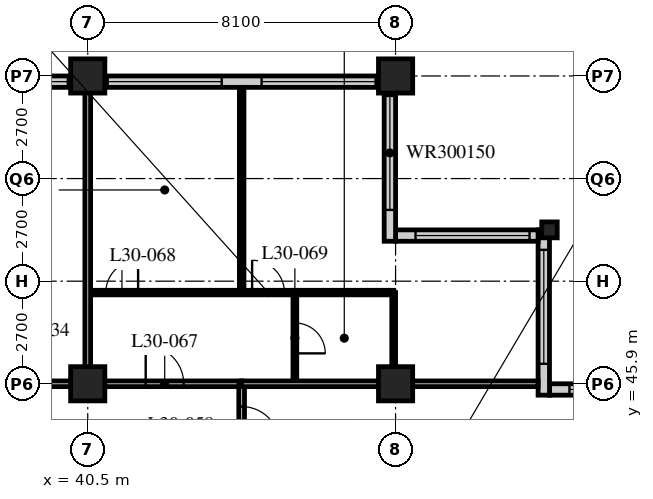
"""IFC4 building model, lengths in metres.
Left out: names, types, materials, properties, quantities, classifications, styles, units other than length and angle.
Written with IfcOpenShell. Run it as: python <this file> out.ifc"""

import sys

from ifc_helpers import new_model, si_unit, direction, frame, frame_2d, origin, origin_2d, place, context, subcontext, project, spatial, rectangle, hollow_rectangle, i_section, extrude, element, fill, save


model = new_model("IFC4")
c1 = context("Model", 3, precision=1e-05, world=origin(), true_north=direction((0.0, 1.0)))
c2 = subcontext(c1, "Body", "Model", "MODEL_VIEW")
j1 = project(units=[si_unit("LENGTHUNIT", "METRE"), si_unit("PLANEANGLEUNIT", "RADIAN")], contexts=[c1])
p1 = place(None, origin())
s1 = spatial("IfcSite", under=j1, at=p1, CompositionType="ELEMENT")
p2 = place(p1, origin())
s2 = spatial("IfcBuilding", under=s1, at=p2, CompositionType="ELEMENT")
p3 = place(p2, frame((0.0, 0.0, 120.4)))
s3 = spatial("IfcBuildingStorey", under=s2, at=p3, CompositionType="ELEMENT", Elevation=120.4)
for number, where, z_axis, x_axis in (
    (1, (40.5, 45.9, 0.0), (0.0, 0.0, 1.0), (1.0, 0.0, 0.0)),
    (2, (40.5, 54.0, 0.0), (0.0, 0.0, 1.0), (1.0, 0.0, 0.0)),
    (3, (48.6, 45.9, 0.0), (0.0, 0.0, 1.0), (1.0, 0.0, 0.0)),
    (4, (48.6, 54.0, 0.0), (0.0, 0.0, 1.0), (1.0, 0.0, 0.0)),
):
    element("IfcColumn", number, at=place(p3, frame(where, z_axis=z_axis, x_axis=x_axis)), inside=s3, PredefinedType="COLUMN", context=c2, shape_type="SweptSolid", body=[
        extrude(hollow_rectangle(XDim=0.9, YDim=0.9, WallThickness=0.09, at=origin_2d()), origin(), (0.0, 0.0, 1.0), 3.4),
    ])
p4 = place(p3, frame((52.65, 49.95, 0.0), z_axis=(0.0, 0.0, 1.0), x_axis=(1.0, 0.0, 0.0)))
e5 = element("IfcColumn", 5, at=p4, inside=s3, PredefinedType="COLUMN", context=c2, shape_type="SweptSolid", body=[
    extrude(i_section(OverallWidth=0.407, OverallDepth=0.419, WebThickness=0.031, FlangeThickness=0.049, FilletRadius=0.015, at=origin_2d()), origin(), (0.0, 0.0, 1.0), 3.4),
])
p5 = place(p3, frame((56.4, 45.75, 0.0), z_axis=(0.0, 0.0, 1.0), x_axis=(-1.0, 0.0, 0.0)))
e6 = element("IfcWall", 6, at=p5, inside=s3, PredefinedType="SOLIDWALL", context=c2, shape_type="SweptSolid", body=[
    extrude(rectangle(XDim=3.75, YDim=0.3, at=frame_2d((1.875, 0.0))), origin(), (0.0, 0.0, 1.0), 3.19),
])
p6 = place(p5, frame((0.225, 0.0, 0.9)))
e7 = element("IfcOpeningElement", 7, at=p6, cuts=e6, PredefinedType="OPENING", context=c2, shape_type="SweptSolid", body=[
    extrude(rectangle(XDim=3.0, YDim=1.5, at=frame_2d((1.5, 0.75))), frame((0.0, 0.16, 0.0), z_axis=(0.0, -1.0, 0.0), x_axis=(1.0, 0.0, 0.0)), (0.0, 0.0, 1.0), 0.32),
])
p7 = place(p3, frame((52.5, 45.6, 0.0), z_axis=(0.0, 0.0, 1.0), x_axis=(0.0, 1.0, 0.0)))
e8 = element("IfcWall", 8, at=p7, inside=s3, PredefinedType="SOLIDWALL", context=c2, shape_type="SweptSolid", body=[
    extrude(rectangle(XDim=4.35, YDim=0.3, at=frame_2d((2.175, 0.0))), origin(), (0.0, 0.0, 1.0), 3.19),
])
p8 = place(p7, frame((0.825, 0.0, 0.9)))
e9 = element("IfcOpeningElement", 9, at=p8, cuts=e8, PredefinedType="OPENING", context=c2, shape_type="SweptSolid", body=[
    extrude(rectangle(XDim=3.0, YDim=1.5, at=frame_2d((1.5, 0.75))), frame((0.0, 0.16, 0.0), z_axis=(0.0, -1.0, 0.0), x_axis=(1.0, 0.0, 0.0)), (0.0, 0.0, 1.0), 0.32),
])
p9 = place(p3, frame((52.35, 49.8, 0.0), z_axis=(0.0, 0.0, 1.0), x_axis=(-1.0, 0.0, 0.0)))
e10 = element("IfcWall", 10, at=p9, inside=s3, PredefinedType="SOLIDWALL", context=c2, shape_type="SweptSolid", body=[
    extrude(rectangle(XDim=3.75, YDim=0.3, at=frame_2d((1.875, 0.0))), origin(), (0.0, 0.0, 1.0), 3.19),
])
p10 = place(p9, frame((0.225, 0.0, 0.9)))
e11 = element("IfcOpeningElement", 11, at=p10, cuts=e10, PredefinedType="OPENING", context=c2, shape_type="SweptSolid", body=[
    extrude(rectangle(XDim=3.0, YDim=1.5, at=frame_2d((1.5, 0.75))), frame((0.0, 0.16, 0.0), z_axis=(0.0, -1.0, 0.0), x_axis=(1.0, 0.0, 0.0)), (0.0, 0.0, 1.0), 0.32),
])
p11 = place(p3, frame((48.45, 49.65, 0.0), z_axis=(0.0, 0.0, 1.0), x_axis=(0.0, 1.0, 0.0)))
e12 = element("IfcWall", 12, at=p11, inside=s3, PredefinedType="SOLIDWALL", context=c2, shape_type="SweptSolid", body=[
    extrude(rectangle(XDim=4.35, YDim=0.3, at=frame_2d((2.175, 0.0))), origin(), (0.0, 0.0, 1.0), 3.19),
])
p12 = place(p11, frame((0.825, 0.0, 0.9)))
e13 = element("IfcOpeningElement", 13, at=p12, cuts=e12, PredefinedType="OPENING", context=c2, shape_type="SweptSolid", body=[
    extrude(rectangle(XDim=3.0, YDim=1.5, at=frame_2d((1.5, 0.75))), frame((0.0, 0.16, 0.0), z_axis=(0.0, -1.0, 0.0), x_axis=(1.0, 0.0, 0.0)), (0.0, 0.0, 1.0), 0.32),
])
p13 = place(p3, frame((48.3, 53.85, 0.0), z_axis=(0.0, 0.0, 1.0), x_axis=(-1.0, 0.0, 0.0)))
e14 = element("IfcWall", 14, at=p13, inside=s3, PredefinedType="SOLIDWALL", context=c2, shape_type="SweptSolid", body=[
    extrude(rectangle(XDim=40.2, YDim=0.3, at=frame_2d((20.1, 0.0))), origin(), (0.0, 0.0, 1.0), 3.19),
])
p14 = place(p13, frame((0.225, 0.0, 0.9)))
e15 = element("IfcOpeningElement", 15, at=p14, cuts=e14, PredefinedType="OPENING", context=c2, shape_type="SweptSolid", body=[
    extrude(rectangle(XDim=3.0, YDim=2.0, at=frame_2d((1.5, 1.0))), frame((0.0, 0.16, 0.0), z_axis=(0.0, -1.0, 0.0), x_axis=(1.0, 0.0, 0.0)), (0.0, 0.0, 1.0), 0.32),
])
p15 = place(p13, frame((4.275, 0.0, 0.9)))
e16 = element("IfcOpeningElement", 16, at=p15, cuts=e14, PredefinedType="OPENING", context=c2, shape_type="SweptSolid", body=[
    extrude(rectangle(XDim=3.0, YDim=2.0, at=frame_2d((1.5, 1.0))), frame((0.0, 0.16, 0.0), z_axis=(0.0, -1.0, 0.0), x_axis=(1.0, 0.0, 0.0)), (0.0, 0.0, 1.0), 0.32),
])
p16 = place(p13, frame((8.325, 0.0, 0.9)))
e17 = element("IfcOpeningElement", 17, at=p16, cuts=e14, PredefinedType="OPENING", context=c2, shape_type="SweptSolid", body=[
    extrude(rectangle(XDim=3.0, YDim=2.0, at=frame_2d((1.5, 1.0))), frame((0.0, 0.16, 0.0), z_axis=(0.0, -1.0, 0.0), x_axis=(1.0, 0.0, 0.0)), (0.0, 0.0, 1.0), 0.32),
])
p17 = place(p13, frame((12.375, 0.0, 0.9)))
e18 = element("IfcOpeningElement", 18, at=p17, cuts=e14, PredefinedType="OPENING", context=c2, shape_type="SweptSolid", body=[
    extrude(rectangle(XDim=3.0, YDim=2.0, at=frame_2d((1.5, 1.0))), frame((0.0, 0.16, 0.0), z_axis=(0.0, -1.0, 0.0), x_axis=(1.0, 0.0, 0.0)), (0.0, 0.0, 1.0), 0.32),
])
p18 = place(p13, frame((16.425, 0.0, 0.9)))
e19 = element("IfcOpeningElement", 19, at=p18, cuts=e14, PredefinedType="OPENING", context=c2, shape_type="SweptSolid", body=[
    extrude(rectangle(XDim=3.0, YDim=2.0, at=frame_2d((1.5, 1.0))), frame((0.0, 0.16, 0.0), z_axis=(0.0, -1.0, 0.0), x_axis=(1.0, 0.0, 0.0)), (0.0, 0.0, 1.0), 0.32),
])
p19 = place(p13, frame((20.475, 0.0, 0.9)))
e20 = element("IfcOpeningElement", 20, at=p19, cuts=e14, PredefinedType="OPENING", context=c2, shape_type="SweptSolid", body=[
    extrude(rectangle(XDim=3.0, YDim=2.0, at=frame_2d((1.5, 1.0))), frame((0.0, 0.16, 0.0), z_axis=(0.0, -1.0, 0.0), x_axis=(1.0, 0.0, 0.0)), (0.0, 0.0, 1.0), 0.32),
])
p20 = place(p13, frame((24.525, 0.0, 0.9)))
e21 = element("IfcOpeningElement", 21, at=p20, cuts=e14, PredefinedType="OPENING", context=c2, shape_type="SweptSolid", body=[
    extrude(rectangle(XDim=3.0, YDim=2.0, at=frame_2d((1.5, 1.0))), frame((0.0, 0.16, 0.0), z_axis=(0.0, -1.0, 0.0), x_axis=(1.0, 0.0, 0.0)), (0.0, 0.0, 1.0), 0.32),
])
p21 = place(p13, frame((28.575, 0.0, 0.9)))
e22 = element("IfcOpeningElement", 22, at=p21, cuts=e14, PredefinedType="OPENING", context=c2, shape_type="SweptSolid", body=[
    extrude(rectangle(XDim=3.0, YDim=2.0, at=frame_2d((1.5, 1.0))), frame((0.0, 0.16, 0.0), z_axis=(0.0, -1.0, 0.0), x_axis=(1.0, 0.0, 0.0)), (0.0, 0.0, 1.0), 0.32),
])
p22 = place(p13, frame((32.625, 0.0, 0.9)))
e23 = element("IfcOpeningElement", 23, at=p22, cuts=e14, PredefinedType="OPENING", context=c2, shape_type="SweptSolid", body=[
    extrude(rectangle(XDim=3.0, YDim=2.0, at=frame_2d((1.5, 1.0))), frame((0.0, 0.16, 0.0), z_axis=(0.0, -1.0, 0.0), x_axis=(1.0, 0.0, 0.0)), (0.0, 0.0, 1.0), 0.32),
])
p23 = place(p13, frame((36.675, 0.0, 0.9)))
e24 = element("IfcOpeningElement", 24, at=p23, cuts=e14, PredefinedType="OPENING", context=c2, shape_type="SweptSolid", body=[
    extrude(rectangle(XDim=3.0, YDim=2.0, at=frame_2d((1.5, 1.0))), frame((0.0, 0.16, 0.0), z_axis=(0.0, -1.0, 0.0), x_axis=(1.0, 0.0, 0.0)), (0.0, 0.0, 1.0), 0.32),
])
p24 = place(p3, frame((12.15, 45.9, 0.0), z_axis=(0.0, 0.0, 1.0), x_axis=(1.0, 0.0, 0.0)))
e25 = element("IfcWall", 25, at=p24, inside=s3, PredefinedType="PARTITIONING", context=c2, shape_type="SweptSolid", body=[
    extrude(rectangle(XDim=32.4, YDim=0.15, at=frame_2d((16.2, 0.0))), origin(), (0.0, 0.0, 1.0), 2.578),
])
p25 = place(p24, frame((5.95, 0.0, 0.0)))
e26 = element("IfcOpeningElement", 26, at=p25, cuts=e25, PredefinedType="OPENING", context=c2, shape_type="SweptSolid", body=[
    extrude(rectangle(XDim=1.0, YDim=2.1, at=frame_2d((0.5, 1.05))), frame((0.0, 0.085, 0.0), z_axis=(0.0, -1.0, 0.0), x_axis=(1.0, 0.0, 0.0)), (0.0, 0.0, 1.0), 0.17),
])
p26 = place(p24, frame((14.05, 0.0, 0.0)))
e27 = element("IfcOpeningElement", 27, at=p26, cuts=e25, PredefinedType="OPENING", context=c2, shape_type="SweptSolid", body=[
    extrude(rectangle(XDim=1.0, YDim=2.1, at=frame_2d((0.5, 1.05))), frame((0.0, 0.085, 0.0), z_axis=(0.0, -1.0, 0.0), x_axis=(1.0, 0.0, 0.0)), (0.0, 0.0, 1.0), 0.17),
])
p27 = place(p24, frame((25.7, 0.0, 0.0)))
e28 = element("IfcOpeningElement", 28, at=p27, cuts=e25, PredefinedType="OPENING", context=c2, shape_type="SweptSolid", body=[
    extrude(rectangle(XDim=1.0, YDim=2.1, at=frame_2d((0.5, 1.05))), frame((0.0, 0.085, 0.0), z_axis=(0.0, -1.0, 0.0), x_axis=(1.0, 0.0, 0.0)), (0.0, 0.0, 1.0), 0.17),
])
p28 = place(p24, frame((29.875, 0.0, 0.0)))
e29 = element("IfcOpeningElement", 29, at=p28, cuts=e25, PredefinedType="OPENING", context=c2, shape_type="SweptSolid", body=[
    extrude(rectangle(XDim=1.0, YDim=2.1, at=frame_2d((0.5, 1.05))), frame((0.0, 0.085, 0.0), z_axis=(0.0, -1.0, 0.0), x_axis=(1.0, 0.0, 0.0)), (0.0, 0.0, 1.0), 0.17),
])
p29 = place(p24, frame((1.525, 0.0, 0.0)))
e30 = element("IfcOpeningElement", 30, at=p29, cuts=e25, PredefinedType="OPENING", context=c2, shape_type="SweptSolid", body=[
    extrude(rectangle(XDim=1.0, YDim=2.1, at=frame_2d((0.5, 1.05))), frame((0.0, 0.085, 0.0), z_axis=(0.0, -1.0, 0.0), x_axis=(1.0, 0.0, 0.0)), (0.0, 0.0, 1.0), 0.17),
])
p30 = place(p3, frame((44.55, 17.55, 0.0), z_axis=(0.0, 0.0, 1.0), x_axis=(0.0, 1.0, 0.0)))
e31 = element("IfcWall", 31, at=p30, inside=s3, PredefinedType="PARTITIONING", context=c2, shape_type="SweptSolid", body=[
    extrude(rectangle(XDim=28.35, YDim=0.15, at=frame_2d((14.175, 0.0))), origin(), (0.0, 0.0, 1.0), 3.19),
])
p31 = place(p30, frame((2.75, 0.0, 0.0)))
e32 = element("IfcOpeningElement", 32, at=p31, cuts=e31, PredefinedType="OPENING", context=c2, shape_type="SweptSolid", body=[
    extrude(rectangle(XDim=1.0, YDim=2.1, at=frame_2d((0.5, 1.05))), frame((0.0, 0.085, 0.0), z_axis=(0.0, -1.0, 0.0), x_axis=(1.0, 0.0, 0.0)), (0.0, 0.0, 1.0), 0.17),
])
p32 = place(p30, frame((6.5, 0.0, 0.0)))
e33 = element("IfcOpeningElement", 33, at=p32, cuts=e31, PredefinedType="OPENING", context=c2, shape_type="SweptSolid", body=[
    extrude(rectangle(XDim=1.0, YDim=2.1, at=frame_2d((0.5, 1.05))), frame((0.0, 0.085, 0.0), z_axis=(0.0, -1.0, 0.0), x_axis=(1.0, 0.0, 0.0)), (0.0, 0.0, 1.0), 0.17),
])
p33 = place(p30, frame((10.0, 0.0, 0.0)))
e34 = element("IfcOpeningElement", 34, at=p33, cuts=e31, PredefinedType="OPENING", context=c2, shape_type="SweptSolid", body=[
    extrude(rectangle(XDim=1.0, YDim=2.1, at=frame_2d((0.5, 1.05))), frame((0.0, 0.085, 0.0), z_axis=(0.0, -1.0, 0.0), x_axis=(1.0, 0.0, 0.0)), (0.0, 0.0, 1.0), 0.17),
])
p34 = place(p30, frame((21.65, 0.0, 0.0)))
e35 = element("IfcOpeningElement", 35, at=p34, cuts=e31, PredefinedType="OPENING", context=c2, shape_type="SweptSolid", body=[
    extrude(rectangle(XDim=1.0, YDim=2.1, at=frame_2d((0.5, 1.05))), frame((0.0, 0.085, 0.0), z_axis=(0.0, -1.0, 0.0), x_axis=(1.0, 0.0, 0.0)), (0.0, 0.0, 1.0), 0.17),
])
p35 = place(p30, frame((26.75, 0.0, 0.0)))
e36 = element("IfcOpeningElement", 36, at=p35, cuts=e31, PredefinedType="OPENING", context=c2, shape_type="SweptSolid", body=[
    extrude(rectangle(XDim=1.0, YDim=2.1, at=frame_2d((0.5, 1.05))), frame((0.0, 0.085, 0.0), z_axis=(0.0, -1.0, 0.0), x_axis=(1.0, 0.0, 0.0)), (0.0, 0.0, 1.0), 0.17),
])
p36 = place(p3, frame((40.5, 48.3, 0.0), z_axis=(0.0, 0.0, 1.0), x_axis=(1.0, 0.0, 0.0)))
e37 = element("IfcWall", 37, at=p36, inside=s3, PredefinedType="PARTITIONING", context=c2, shape_type="SweptSolid", body=[
    extrude(rectangle(XDim=8.05, YDim=0.12, at=frame_2d((4.025, 0.0))), origin(), (0.0, 0.0, 1.0), 3.19),
])
p37 = place(p36, frame((0.475, 0.0, 0.0)))
e38 = element("IfcOpeningElement", 38, at=p37, cuts=e37, PredefinedType="OPENING", context=c2, shape_type="SweptSolid", body=[
    extrude(rectangle(XDim=0.85, YDim=2.1, at=frame_2d((0.425, 1.05))), frame((0.0, 0.07, 0.0), z_axis=(0.0, -1.0, 0.0), x_axis=(1.0, 0.0, 0.0)), (0.0, 0.0, 1.0), 0.14),
])
p38 = place(p36, frame((4.325, 0.0, 0.0)))
e39 = element("IfcOpeningElement", 39, at=p38, cuts=e37, PredefinedType="OPENING", context=c2, shape_type="SweptSolid", body=[
    extrude(rectangle(XDim=0.85, YDim=2.1, at=frame_2d((0.425, 1.05))), frame((0.0, 0.07, 0.0), z_axis=(0.0, -1.0, 0.0), x_axis=(1.0, 0.0, 0.0)), (0.0, 0.0, 1.0), 0.14),
])
p39 = place(p3, frame((45.95, 45.9, 0.0), z_axis=(0.0, 0.0, 1.0), x_axis=(0.0, 1.0, 0.0)))
e40 = element("IfcWall", 40, at=p39, inside=s3, PredefinedType="PARTITIONING", context=c2, shape_type="SweptSolid", body=[
    extrude(rectangle(XDim=2.4, YDim=0.1, at=frame_2d((1.2, 0.0))), origin(), (0.0, 0.0, 1.0), 3.19),
])
p40 = place(p39, frame((0.8, 0.0, 0.0)))
e41 = element("IfcOpeningElement", 41, at=p40, cuts=e40, PredefinedType="OPENING", context=c2, shape_type="SweptSolid", body=[
    extrude(rectangle(XDim=0.8, YDim=2.1, at=frame_2d((0.4, 1.05))), frame((0.0, 0.06, 0.0), z_axis=(0.0, -1.0, 0.0), x_axis=(1.0, 0.0, 0.0)), (0.0, 0.0, 1.0), 0.12),
])
p41 = place(p3, frame((48.55, 45.9, 0.0), z_axis=(0.0, 0.0, 1.0), x_axis=(0.0, 1.0, 0.0)))
e42 = element("IfcWall", 42, at=p41, inside=s3, PredefinedType="PARTITIONING", context=c2, shape_type="SweptSolid", body=[
    extrude(rectangle(XDim=2.4, YDim=0.1, at=frame_2d((1.2, 0.0))), origin(), (0.0, 0.0, 1.0), 2.578),
])
p42 = place(p3, frame((44.55, 48.3, 0.0), z_axis=(0.0, 0.0, 1.0), x_axis=(0.0, 1.0, 0.0)))
e43 = element("IfcWall", 43, at=p42, inside=s3, PredefinedType="PARTITIONING", context=c2, shape_type="SweptSolid", body=[
    extrude(rectangle(XDim=5.4, YDim=0.12, at=frame_2d((2.7, 0.0))), origin(), (0.0, 0.0, 1.0), 3.19),
])
for number, where, z_axis, x_axis in (
    (44, (44.55, 45.9, 0.0), (0.0, 0.0, 1.0), (1.0, 0.0, 0.0)),
    (45, (40.5, 45.9, 0.0), (0.0, 0.0, 1.0), (0.0, 1.0, 0.0)),
):
    element("IfcWall", number, at=place(p3, frame(where, z_axis=z_axis, x_axis=x_axis)), inside=s3, PredefinedType="PARTITIONING", context=c2, shape_type="SweptSolid", body=[
        extrude(rectangle(XDim=7.8, YDim=0.15, at=frame_2d((3.9, 0.0))), origin(), (0.0, 0.0, 1.0), 2.578),
    ])
p43 = place(p6, origin())
e46 = element("IfcWindow", 46, at=p43, inside=s3, PartitioningType="SINGLE_PANEL", PredefinedType="WINDOW", context=c2, shape_type="SweptSolid", body=[
    extrude(rectangle(XDim=3.0, YDim=1.5, at=frame_2d((1.5, 0.75))), frame((0.0, 0.03, 0.0), z_axis=(0.0, -1.0, 0.0), x_axis=(1.0, 0.0, 0.0)), (0.0, 0.0, 1.0), 0.06),
])
fill(e7, e46)
p44 = place(p8, origin())
e47 = element("IfcWindow", 47, at=p44, inside=s3, PartitioningType="SINGLE_PANEL", PredefinedType="WINDOW", context=c2, shape_type="SweptSolid", body=[
    extrude(rectangle(XDim=3.0, YDim=1.5, at=frame_2d((1.5, 0.75))), frame((0.0, 0.03, 0.0), z_axis=(0.0, -1.0, 0.0), x_axis=(1.0, 0.0, 0.0)), (0.0, 0.0, 1.0), 0.06),
])
fill(e9, e47)
p45 = place(p10, origin())
e48 = element("IfcWindow", 48, at=p45, inside=s3, PartitioningType="SINGLE_PANEL", PredefinedType="WINDOW", context=c2, shape_type="SweptSolid", body=[
    extrude(rectangle(XDim=3.0, YDim=1.5, at=frame_2d((1.5, 0.75))), frame((0.0, 0.03, 0.0), z_axis=(0.0, -1.0, 0.0), x_axis=(1.0, 0.0, 0.0)), (0.0, 0.0, 1.0), 0.06),
])
fill(e11, e48)
p46 = place(p12, origin())
e49 = element("IfcWindow", 49, at=p46, inside=s3, PartitioningType="SINGLE_PANEL", PredefinedType="WINDOW", context=c2, shape_type="SweptSolid", body=[
    extrude(rectangle(XDim=3.0, YDim=1.5, at=frame_2d((1.5, 0.75))), frame((0.0, 0.03, 0.0), z_axis=(0.0, -1.0, 0.0), x_axis=(1.0, 0.0, 0.0)), (0.0, 0.0, 1.0), 0.06),
])
fill(e13, e49)
p47 = place(p14, origin())
e50 = element("IfcWindow", 50, at=p47, inside=s3, PartitioningType="SINGLE_PANEL", PredefinedType="WINDOW", context=c2, shape_type="SweptSolid", body=[
    extrude(rectangle(XDim=3.0, YDim=2.0, at=frame_2d((1.5, 1.0))), frame((0.0, 0.03, 0.0), z_axis=(0.0, -1.0, 0.0), x_axis=(1.0, 0.0, 0.0)), (0.0, 0.0, 1.0), 0.06),
])
fill(e15, e50)
p48 = place(p15, origin())
e51 = element("IfcWindow", 51, at=p48, inside=s3, PartitioningType="SINGLE_PANEL", PredefinedType="WINDOW", context=c2, shape_type="SweptSolid", body=[
    extrude(rectangle(XDim=3.0, YDim=2.0, at=frame_2d((1.5, 1.0))), frame((0.0, 0.03, 0.0), z_axis=(0.0, -1.0, 0.0), x_axis=(1.0, 0.0, 0.0)), (0.0, 0.0, 1.0), 0.06),
])
fill(e16, e51)
p49 = place(p16, origin())
e52 = element("IfcWindow", 52, at=p49, inside=s3, PartitioningType="SINGLE_PANEL", PredefinedType="WINDOW", context=c2, shape_type="SweptSolid", body=[
    extrude(rectangle(XDim=3.0, YDim=2.0, at=frame_2d((1.5, 1.0))), frame((0.0, 0.03, 0.0), z_axis=(0.0, -1.0, 0.0), x_axis=(1.0, 0.0, 0.0)), (0.0, 0.0, 1.0), 0.06),
])
fill(e17, e52)
p50 = place(p35, origin())
e53 = element("IfcDoor", 53, at=p50, inside=s3, OperationType="SINGLE_SWING_RIGHT", PredefinedType="DOOR", context=c2, shape_type="SweptSolid", body=[
    extrude(rectangle(XDim=1.0, YDim=2.1, at=frame_2d((0.5, 1.05))), frame((0.0, 0.025, 0.0), z_axis=(0.0, -1.0, 0.0), x_axis=(1.0, 0.0, 0.0)), (0.0, 0.0, 1.0), 0.05),
])
fill(e36, e53)
p51 = place(p28, origin())
e54 = element("IfcDoor", 54, at=p51, inside=s3, OperationType="SINGLE_SWING_LEFT", PredefinedType="DOOR", context=c2, shape_type="SweptSolid", body=[
    extrude(rectangle(XDim=1.0, YDim=2.1, at=frame_2d((0.5, 1.05))), frame((0.0, 0.025, 0.0), z_axis=(0.0, -1.0, 0.0), x_axis=(1.0, 0.0, 0.0)), (0.0, 0.0, 1.0), 0.05),
])
fill(e29, e54)
p52 = place(p37, origin())
e55 = element("IfcDoor", 55, at=p52, inside=s3, OperationType="SINGLE_SWING_RIGHT", PredefinedType="DOOR", context=c2, shape_type="SweptSolid", body=[
    extrude(rectangle(XDim=0.85, YDim=2.1, at=frame_2d((0.425, 1.05))), frame((0.0, 0.025, 0.0), z_axis=(0.0, -1.0, 0.0), x_axis=(1.0, 0.0, 0.0)), (0.0, 0.0, 1.0), 0.05),
])
fill(e38, e55)
p53 = place(p40, origin())
e56 = element("IfcDoor", 56, at=p53, inside=s3, OperationType="SINGLE_SWING_RIGHT", PredefinedType="DOOR", context=c2, shape_type="SweptSolid", body=[
    extrude(rectangle(XDim=0.8, YDim=2.1, at=frame_2d((0.4, 1.05))), frame((0.0, 0.025, 0.0), z_axis=(0.0, -1.0, 0.0), x_axis=(1.0, 0.0, 0.0)), (0.0, 0.0, 1.0), 0.05),
])
fill(e41, e56)
p54 = place(p38, origin())
e57 = element("IfcDoor", 57, at=p54, inside=s3, OperationType="SINGLE_SWING_LEFT", PredefinedType="DOOR", context=c2, shape_type="SweptSolid", body=[
    extrude(rectangle(XDim=0.85, YDim=2.1, at=frame_2d((0.425, 1.05))), frame((0.0, 0.025, 0.0), z_axis=(0.0, -1.0, 0.0), x_axis=(1.0, 0.0, 0.0)), (0.0, 0.0, 1.0), 0.05),
])
fill(e39, e57)
save(model, sys.argv[1])
